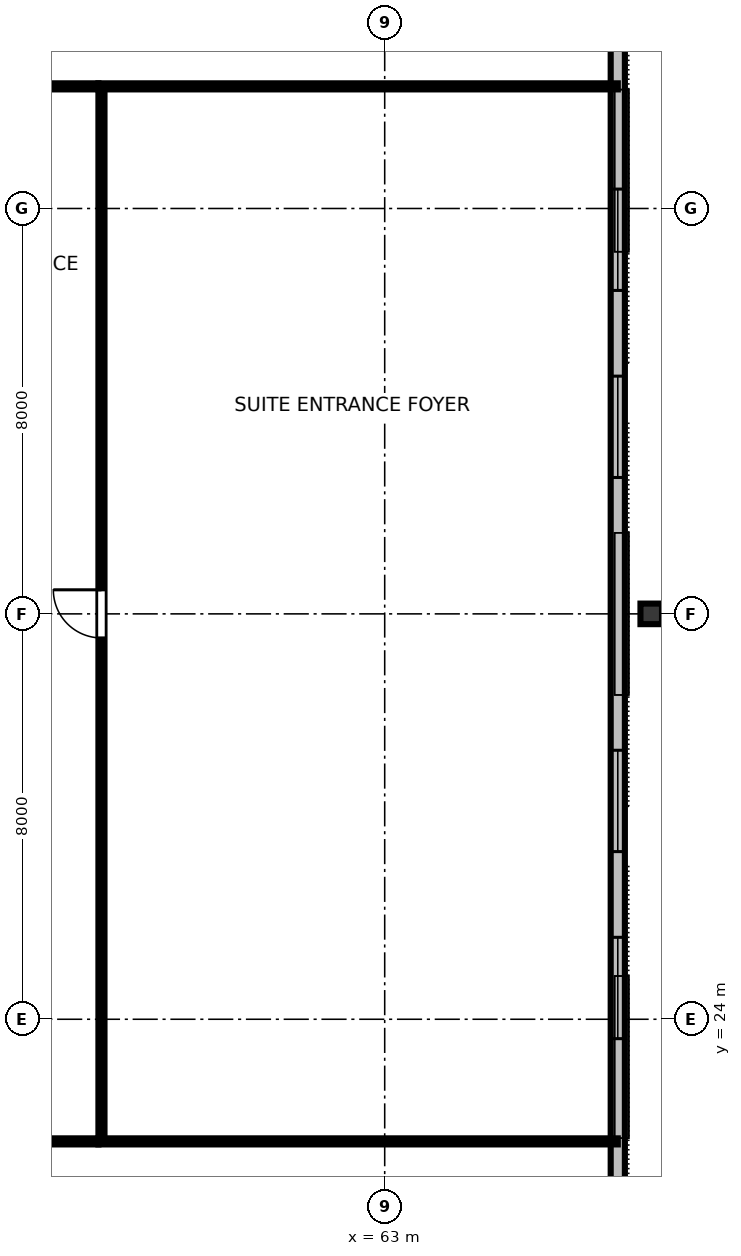
"""IFC4 building model, lengths in metres.
Left out: names, types, materials, properties, quantities, classifications, styles, units other than length and angle.
Written with IfcOpenShell. Run it as: python <this file> out.ifc"""

import sys

from ifc_helpers import new_model, si_unit, direction, frame, frame_2d, origin, origin_2d, place, context, subcontext, project, spatial, rectangle, i_section, extrude, element, fill, save


model = new_model("IFC4")
c1 = context("Model", 3, precision=1e-05, world=origin(), true_north=direction((0.0, 1.0)))
c2 = subcontext(c1, "Body", "Model", "MODEL_VIEW")
j1 = project(units=[si_unit("LENGTHUNIT", "METRE"), si_unit("PLANEANGLEUNIT", "RADIAN")], contexts=[c1])
p1 = place(None, origin())
s1 = spatial("IfcSite", under=j1, at=p1, CompositionType="ELEMENT")
p2 = place(p1, origin())
s2 = spatial("IfcBuilding", under=s1, at=p2, CompositionType="ELEMENT")
p3 = place(p2, frame((0.0, 0.0, 187.8)))
s3 = spatial("IfcBuildingStorey", under=s2, at=p3, CompositionType="ELEMENT", Elevation=187.8)
p4 = place(p3, frame((68.26, 32.0, 0.0), z_axis=(0.0, 0.0, 1.0), x_axis=(0.0, 1.0, 0.0)))
e1 = element("IfcColumn", 1, at=p4, inside=s3, PredefinedType="COLUMN", context=c2, shape_type="SweptSolid", body=[
    extrude(i_section(OverallWidth=0.406, OverallDepth=0.425, WebThickness=0.033, FlangeThickness=0.052, FilletRadius=0.025, at=origin_2d()), origin(), (0.0, 0.0, 1.0), 3.373),
])
p5 = place(p3, frame((67.6, 17.98, 0.0), z_axis=(0.0, 0.0, 1.0), x_axis=(0.0, 1.0, 0.0)))
e2 = element("IfcWall", 2, at=p5, inside=s3, PredefinedType="STANDARD", context=c2, shape_type="SweptSolid", body=[
    extrude(rectangle(XDim=28.04, YDim=0.28, at=frame_2d((14.02, 0.0))), origin(), (0.0, 0.0, 1.0), 3.375),
])
p6 = place(p5, frame((5.637, 0.0, 0.8)))
e3 = element("IfcOpeningElement", 3, at=p6, cuts=e2, PredefinedType="OPENING", context=c2, shape_type="SweptSolid", body=[
    extrude(rectangle(XDim=2.0, YDim=1.95, at=frame_2d((1.0, 0.975))), frame((0.0, 0.15, 0.0), z_axis=(0.0, -1.0, 0.0), x_axis=(1.0, 0.0, 0.0)), (0.0, 0.0, 1.0), 0.3),
])
p7 = place(p5, frame((9.329, 0.0, 0.8)))
e4 = element("IfcOpeningElement", 4, at=p7, cuts=e2, PredefinedType="OPENING", context=c2, shape_type="SweptSolid", body=[
    extrude(rectangle(XDim=2.0, YDim=1.95, at=frame_2d((1.0, 0.975))), frame((0.0, 0.15, 0.0), z_axis=(0.0, -1.0, 0.0), x_axis=(1.0, 0.0, 0.0)), (0.0, 0.0, 1.0), 0.3),
])
p8 = place(p5, frame((16.711, 0.0, 0.8)))
e5 = element("IfcOpeningElement", 5, at=p8, cuts=e2, PredefinedType="OPENING", context=c2, shape_type="SweptSolid", body=[
    extrude(rectangle(XDim=2.0, YDim=1.95, at=frame_2d((1.0, 0.975))), frame((0.0, 0.15, 0.0), z_axis=(0.0, -1.0, 0.0), x_axis=(1.0, 0.0, 0.0)), (0.0, 0.0, 1.0), 0.3),
])
p9 = place(p5, frame((20.403, 0.0, 0.8)))
e6 = element("IfcOpeningElement", 6, at=p9, cuts=e2, PredefinedType="OPENING", context=c2, shape_type="SweptSolid", body=[
    extrude(rectangle(XDim=2.0, YDim=1.95, at=frame_2d((1.0, 0.975))), frame((0.0, 0.15, 0.0), z_axis=(0.0, -1.0, 0.0), x_axis=(1.0, 0.0, 0.0)), (0.0, 0.0, 1.0), 0.3),
])
p10 = place(p3, frame((47.02, 21.59, 0.0), z_axis=(0.0, 0.0, 1.0), x_axis=(1.0, 0.0, 0.0)))
e7 = element("IfcWall", 7, at=p10, inside=s3, PredefinedType="PARTITIONING", context=c2, shape_type="SweptSolid", body=[
    extrude(rectangle(XDim=10.33, YDim=0.12, at=frame_2d((5.165, 0.0))), origin(), (0.0, 0.0, 1.0), 2.655),
])
p11 = place(p10, frame((4.924, 0.0, 0.0)))
e8 = element("IfcOpeningElement", 8, at=p11, cuts=e7, PredefinedType="OPENING", context=c2, shape_type="SweptSolid", body=[
    extrude(rectangle(XDim=0.95, YDim=2.15, at=frame_2d((0.475, 1.075))), frame((0.0, 0.07, 0.0), z_axis=(0.0, -1.0, 0.0), x_axis=(1.0, 0.0, 0.0)), (0.0, 0.0, 1.0), 0.14),
])
p12 = place(p3, frame((47.02, 42.41, 0.0), z_axis=(0.0, 0.0, 1.0), x_axis=(1.0, 0.0, 0.0)))
e9 = element("IfcWall", 9, at=p12, inside=s3, PredefinedType="PARTITIONING", context=c2, shape_type="SweptSolid", body=[
    extrude(rectangle(XDim=10.33, YDim=0.12, at=frame_2d((5.165, 0.0))), origin(), (0.0, 0.0, 1.0), 2.655),
])
p13 = place(p12, frame((4.986, 0.0, 0.0)))
e10 = element("IfcOpeningElement", 10, at=p13, cuts=e9, PredefinedType="OPENING", context=c2, shape_type="SweptSolid", body=[
    extrude(rectangle(XDim=0.95, YDim=2.15, at=frame_2d((0.475, 1.075))), frame((0.0, 0.07, 0.0), z_axis=(0.0, -1.0, 0.0), x_axis=(1.0, 0.0, 0.0)), (0.0, 0.0, 1.0), 0.14),
])
p14 = place(p3, frame((57.41, 21.65, 0.0), z_axis=(0.0, 0.0, 1.0), x_axis=(0.0, 1.0, 0.0)))
e11 = element("IfcWall", 11, at=p14, inside=s3, PredefinedType="PARTITIONING", context=c2, shape_type="SweptSolid", body=[
    extrude(rectangle(XDim=20.7, YDim=0.12, at=frame_2d((10.35, 0.0))), origin(), (0.0, 0.0, 1.0), 2.655),
])
p15 = place(p14, frame((9.875, 0.0, 0.0)))
e12 = element("IfcOpeningElement", 12, at=p15, cuts=e11, PredefinedType="OPENING", context=c2, shape_type="SweptSolid", body=[
    extrude(rectangle(XDim=0.95, YDim=2.15, at=frame_2d((0.475, 1.075))), frame((0.0, 0.07, 0.0), z_axis=(0.0, -1.0, 0.0), x_axis=(1.0, 0.0, 0.0)), (0.0, 0.0, 1.0), 0.14),
])
for number, where, z_axis, x_axis in (
    (13, (57.35, 21.59, 0.0), (0.0, 0.0, 1.0), (1.0, 0.0, 0.0)),
    (14, (57.35, 42.41, 0.0), (0.0, 0.0, 1.0), (1.0, 0.0, 0.0)),
):
    element("IfcWall", number, at=place(p3, frame(where, z_axis=z_axis, x_axis=x_axis)), inside=s3, PredefinedType="PARTITIONING", context=c2, shape_type="SweptSolid", body=[
        extrude(rectangle(XDim=10.25, YDim=0.12, at=frame_2d((5.125, 0.0))), origin(), (0.0, 0.0, 1.0), 2.655),
    ])
p16 = place(p6, origin())
e15 = element("IfcWindow", 15, at=p16, inside=s3, PartitioningType="SINGLE_PANEL", PredefinedType="WINDOW", context=c2, shape_type="SweptSolid", body=[
    extrude(rectangle(XDim=2.0, YDim=1.95, at=frame_2d((1.0, 0.975))), frame((0.0, 0.03, 0.0), z_axis=(0.0, -1.0, 0.0), x_axis=(1.0, 0.0, 0.0)), (0.0, 0.0, 1.0), 0.06),
])
fill(e3, e15)
p17 = place(p7, origin())
e16 = element("IfcWindow", 16, at=p17, inside=s3, PartitioningType="SINGLE_PANEL", PredefinedType="WINDOW", context=c2, shape_type="SweptSolid", body=[
    extrude(rectangle(XDim=2.0, YDim=1.95, at=frame_2d((1.0, 0.975))), frame((0.0, 0.03, 0.0), z_axis=(0.0, -1.0, 0.0), x_axis=(1.0, 0.0, 0.0)), (0.0, 0.0, 1.0), 0.06),
])
fill(e4, e16)
p18 = place(p8, origin())
e17 = element("IfcWindow", 17, at=p18, inside=s3, PartitioningType="SINGLE_PANEL", PredefinedType="WINDOW", context=c2, shape_type="SweptSolid", body=[
    extrude(rectangle(XDim=2.0, YDim=1.95, at=frame_2d((1.0, 0.975))), frame((0.0, 0.03, 0.0), z_axis=(0.0, -1.0, 0.0), x_axis=(1.0, 0.0, 0.0)), (0.0, 0.0, 1.0), 0.06),
])
fill(e5, e17)
p19 = place(p9, origin())
e18 = element("IfcWindow", 18, at=p19, inside=s3, PartitioningType="SINGLE_PANEL", PredefinedType="WINDOW", context=c2, shape_type="SweptSolid", body=[
    extrude(rectangle(XDim=2.0, YDim=1.95, at=frame_2d((1.0, 0.975))), frame((0.0, 0.03, 0.0), z_axis=(0.0, -1.0, 0.0), x_axis=(1.0, 0.0, 0.0)), (0.0, 0.0, 1.0), 0.06),
])
fill(e6, e18)
p20 = place(p15, origin())
e19 = element("IfcDoor", 19, at=p20, inside=s3, OperationType="SINGLE_SWING_RIGHT", PredefinedType="DOOR", context=c2, shape_type="SweptSolid", body=[
    extrude(rectangle(XDim=0.95, YDim=2.15, at=frame_2d((0.475, 1.075))), frame((0.0, 0.025, 0.0), z_axis=(0.0, -1.0, 0.0), x_axis=(1.0, 0.0, 0.0)), (0.0, 0.0, 1.0), 0.05),
])
fill(e12, e19)
save(model, sys.argv[1])
